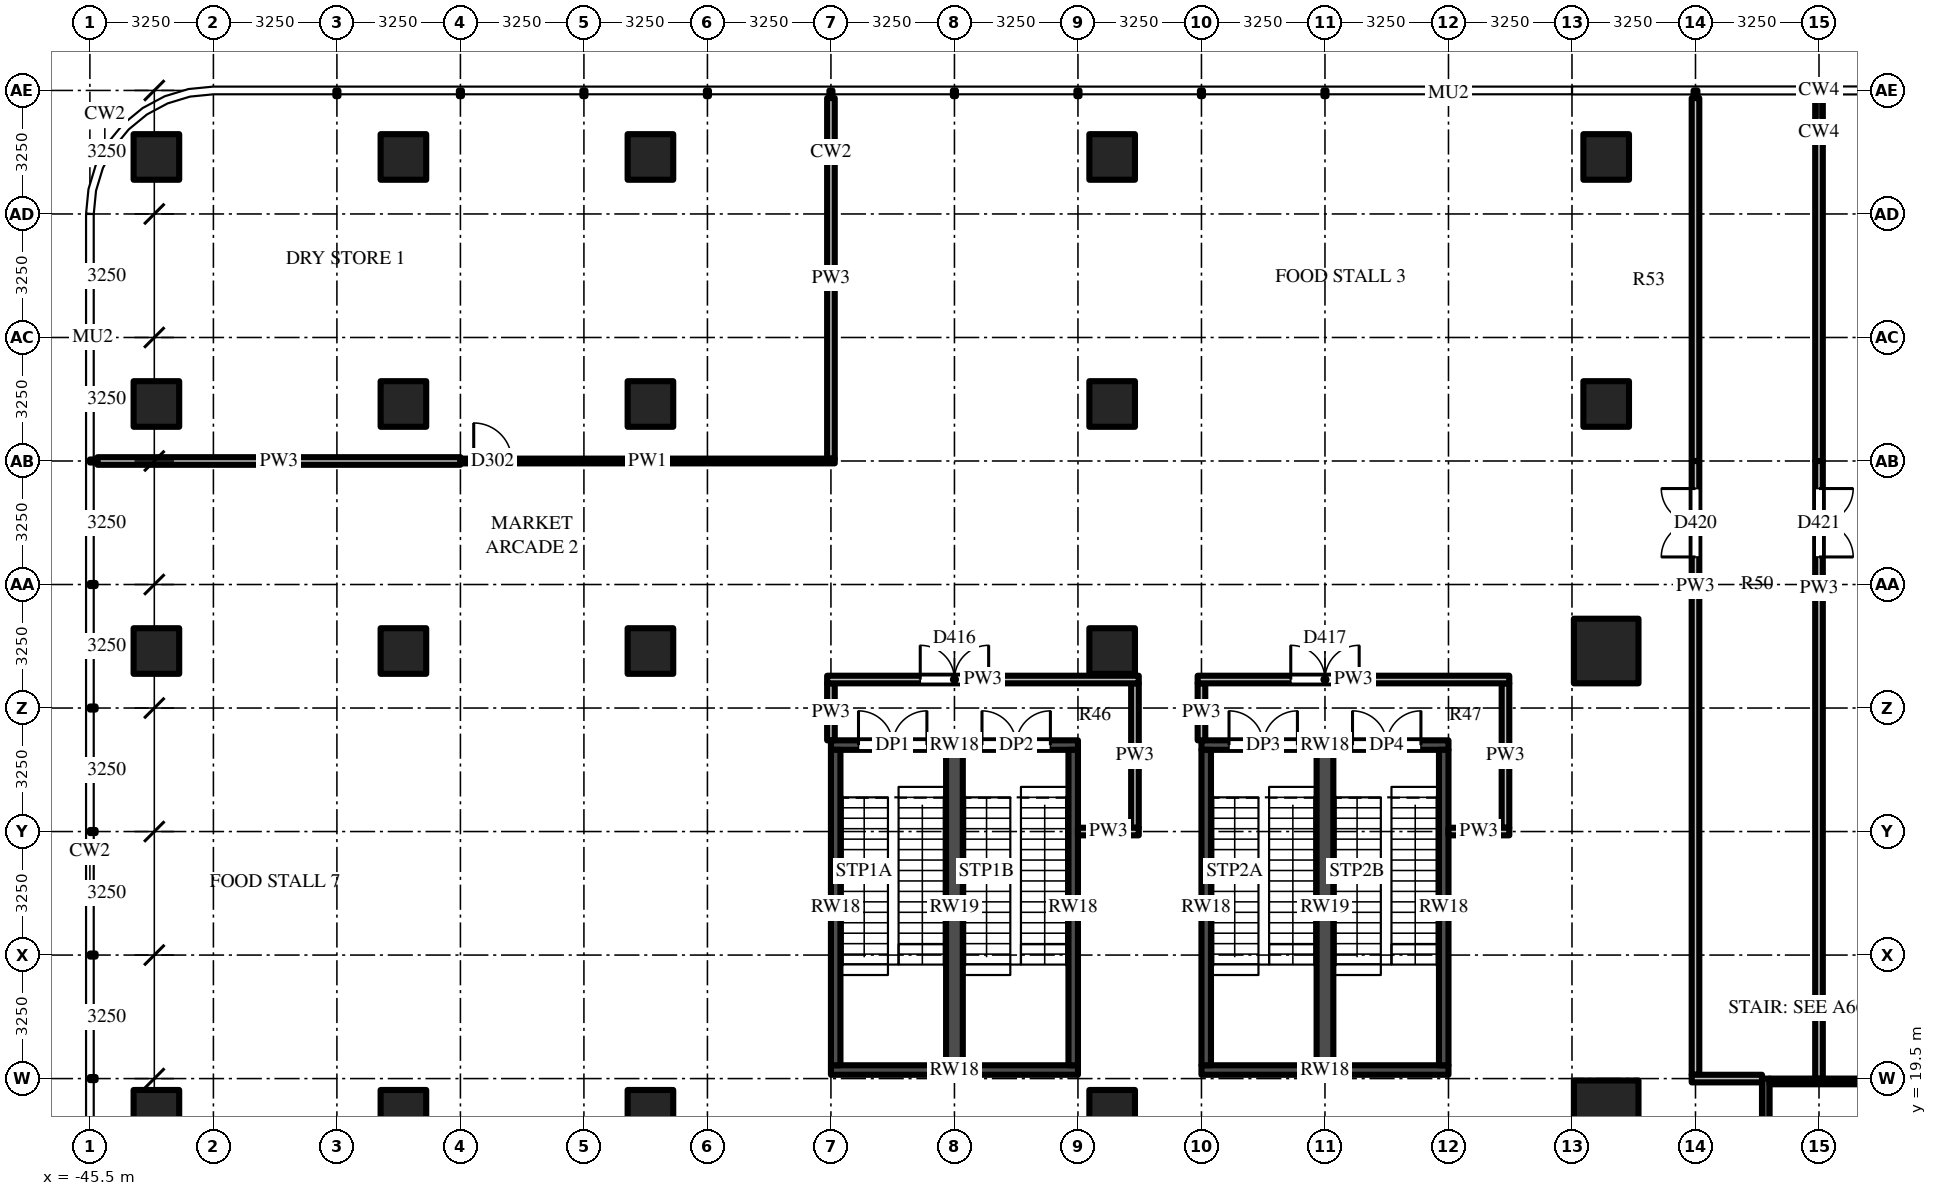
"""IFC4 building model, lengths in metres.
Left out: names, types, materials, properties, quantities, classifications, styles, units other than length and angle.
Written with IfcOpenShell. Run it as: python <this file> out.ifc"""

import sys

from ifc_helpers import new_model, si_unit, direction, frame, frame_2d, origin, origin_2d, place, context, subcontext, project, spatial, rectangle, extrude, source, transform, mapped, element, fill, save


model = new_model("IFC4")
c1 = context("Model", 3, precision=1e-05, world=origin(), true_north=direction((0.0, 1.0)))
c2 = subcontext(c1, "Body", "Model", "MODEL_VIEW")
j1 = project(units=[si_unit("LENGTHUNIT", "METRE"), si_unit("PLANEANGLEUNIT", "RADIAN")], contexts=[c1])
p1 = place(None, origin())
s1 = spatial("IfcSite", under=j1, at=p1, CompositionType="ELEMENT")
p2 = place(p1, origin())
s2 = spatial("IfcBuilding", under=s1, at=p2, CompositionType="ELEMENT")
p3 = place(p2, frame((0.0, 0.0, 8.0)))
s3 = spatial("IfcBuildingStorey", under=s2, at=p3, CompositionType="ELEMENT", Elevation=8.0)
m1 = source(origin(), c2, "Body", "SweptSolid", [
    extrude(rectangle(XDim=1.7, YDim=1.7, at=origin_2d()), origin(), (0.0, 0.0, 1.0), 6.0),
])
for number, where, z_axis, x_axis in (
    (1, (-5.6, 18.6, 0.0), (0.0, 0.0, 1.0), (1.0, 0.0, 0.0)),
    (2, (-5.6, 30.75, 0.0), (0.0, 0.0, 1.0), (1.0, 0.0, 0.0)),
):
    element("IfcColumn", number, at=place(p3, frame(where, z_axis=z_axis, x_axis=x_axis)), inside=s3, PredefinedType="COLUMN", context=c2, shape_type="MappedRepresentation", body=[
        mapped(m1, transform((0.0, 0.0, 0.0))),
    ])
m2 = source(origin(), c2, "Body", "SweptSolid", [
    extrude(rectangle(XDim=1.2, YDim=1.2, at=origin_2d()), origin(), (0.0, 0.0, 1.0), 6.0),
])
for number, where, z_axis, x_axis in (
    (3, (-5.6, 37.25, 0.0), (0.0, 0.0, 1.0), (1.0, 0.0, 0.0)),
    (4, (-5.6, 43.75, 0.0), (0.0, 0.0, 1.0), (1.0, 0.0, 0.0)),
    (5, (-18.6, 18.6, 0.0), (0.0, 0.0, 1.0), (1.0, 0.0, 0.0)),
    (6, (-18.6, 30.75, 0.0), (0.0, 0.0, 1.0), (1.0, 0.0, 0.0)),
    (7, (-18.6, 37.25, 0.0), (0.0, 0.0, 1.0), (1.0, 0.0, 0.0)),
    (8, (-18.6, 43.75, 0.0), (0.0, 0.0, 1.0), (1.0, 0.0, 0.0)),
    (9, (-30.75, 18.6, 0.0), (0.0, 0.0, 1.0), (1.0, 0.0, 0.0)),
    (10, (-30.75, 30.75, 0.0), (0.0, 0.0, 1.0), (1.0, 0.0, 0.0)),
    (11, (-30.75, 37.25, 0.0), (0.0, 0.0, 1.0), (1.0, 0.0, 0.0)),
    (12, (-30.75, 43.75, 0.0), (0.0, 0.0, 1.0), (1.0, 0.0, 0.0)),
    (13, (-37.25, 18.6, 0.0), (0.0, 0.0, 1.0), (1.0, 0.0, 0.0)),
    (14, (-37.25, 30.75, 0.0), (0.0, 0.0, 1.0), (1.0, 0.0, 0.0)),
    (15, (-37.25, 37.25, 0.0), (0.0, 0.0, 1.0), (1.0, 0.0, 0.0)),
    (16, (-37.25, 43.75, 0.0), (0.0, 0.0, 1.0), (1.0, 0.0, 0.0)),
    (17, (-43.75, 18.6, 0.0), (0.0, 0.0, 1.0), (1.0, 0.0, 0.0)),
    (18, (-43.75, 30.75, 0.0), (0.0, 0.0, 1.0), (1.0, 0.0, 0.0)),
    (19, (-43.75, 37.25, 0.0), (0.0, 0.0, 1.0), (1.0, 0.0, 0.0)),
    (20, (-43.75, 43.75, 0.0), (0.0, 0.0, 1.0), (1.0, 0.0, 0.0)),
):
    element("IfcColumn", number, at=place(p3, frame(where, z_axis=z_axis, x_axis=x_axis)), inside=s3, PredefinedType="COLUMN", context=c2, shape_type="MappedRepresentation", body=[
        mapped(m2, transform((0.0, 0.0, 0.0))),
    ])
m3 = source(origin(), c2, "Body", "SweptSolid", [
    extrude(rectangle(XDim=6.0, YDim=0.2, at=frame_2d((3.0, 0.0))), origin(), (0.0, 0.0, 1.0), 5.7),
])
p4 = place(p3, frame((-1.4, 13.5, 0.0), z_axis=(0.0, 0.0, 1.0), x_axis=(0.0, 1.0, 0.0)))
e21 = element("IfcWall", 21, at=p4, inside=s3, PredefinedType="SHEAR", context=c2, shape_type="MappedRepresentation", body=[
    mapped(m3, transform((0.0, 0.0, 0.0))),
])
m4 = source(origin(), c2, "Body", "SweptSolid", [
    extrude(rectangle(XDim=2.6, YDim=0.15, at=frame_2d((1.3, 0.0))), origin(), (0.0, 0.0, 1.0), 5.7),
])
p5 = place(p3, frame((-1.3, 19.425, 0.0), z_axis=(0.0, 0.0, 1.0), x_axis=(1.0, 0.0, 0.0)))
e22 = element("IfcWall", 22, at=p5, inside=s3, PredefinedType="SHEAR", context=c2, shape_type="MappedRepresentation", body=[
    mapped(m4, transform((0.0, 0.0, 0.0))),
])
m5 = source(origin(), c2, "Body", "SweptSolid", [
    extrude(rectangle(XDim=6.5, YDim=0.25, at=frame_2d((3.25, 0.0))), origin(), (0.0, 0.0, 1.0), 5.7),
])
p6 = place(p3, frame((-26.0, 28.275, 0.0), z_axis=(0.0, 0.0, 1.0), x_axis=(1.0, 0.0, 0.0)))
e23 = element("IfcWall", 23, at=p6, inside=s3, PredefinedType="SHEAR", context=c2, shape_type="MappedRepresentation", body=[
    mapped(m5, transform((0.0, 0.0, 0.0))),
])
m6 = source(origin(), c2, "Body", "SweptSolid", [
    extrude(rectangle(XDim=1.8, YDim=2.1, at=frame_2d((0.9, 1.05))), frame((0.0, 0.135, 0.0), z_axis=(0.0, -1.0, 0.0), x_axis=(1.0, 0.0, 0.0)), (0.0, 0.0, 1.0), 0.27),
])
p7 = place(p6, frame((0.725, 0.0, 0.0)))
e24 = element("IfcOpeningElement", 24, at=p7, cuts=e23, PredefinedType="OPENING", context=c2, shape_type="MappedRepresentation", body=[
    mapped(m6, transform((0.0, 0.0, 0.0))),
])
p8 = place(p6, frame((3.975, 0.0, 0.0)))
e25 = element("IfcOpeningElement", 25, at=p8, cuts=e23, PredefinedType="OPENING", context=c2, shape_type="MappedRepresentation", body=[
    mapped(m6, transform((0.0, 0.0, 0.0))),
])
p9 = place(p3, frame((-26.0, 19.725, 0.0), z_axis=(0.0, 0.0, 1.0), x_axis=(1.0, 0.0, 0.0)))
e26 = element("IfcWall", 26, at=p9, inside=s3, PredefinedType="SHEAR", context=c2, shape_type="MappedRepresentation", body=[
    mapped(m5, transform((0.0, 0.0, 0.0))),
])
m7 = source(origin(), c2, "Body", "SweptSolid", [
    extrude(rectangle(XDim=8.3, YDim=0.25, at=frame_2d((4.15, 0.0))), origin(), (0.0, 0.0, 1.0), 5.7),
])
for number, where, z_axis, x_axis in (
    (27, (-25.875, 19.85, 0.0), (0.0, 0.0, 1.0), (0.0, 1.0, 0.0)),
    (28, (-19.625, 19.85, 0.0), (0.0, 0.0, 1.0), (0.0, 1.0, 0.0)),
):
    element("IfcWall", number, at=place(p3, frame(where, z_axis=z_axis, x_axis=x_axis)), inside=s3, PredefinedType="SHEAR", context=c2, shape_type="MappedRepresentation", body=[
        mapped(m7, transform((0.0, 0.0, 0.0))),
    ])
m8 = source(origin(), c2, "Body", "SweptSolid", [
    extrude(rectangle(XDim=8.3, YDim=0.44, at=frame_2d((4.15, 0.0))), origin(), (0.0, 0.0, 1.0), 5.7),
])
p10 = place(p3, frame((-22.75, 19.85, 0.0), z_axis=(0.0, 0.0, 1.0), x_axis=(0.0, 1.0, 0.0)))
e29 = element("IfcWall", 29, at=p10, inside=s3, PredefinedType="SHEAR", context=c2, shape_type="MappedRepresentation", body=[
    mapped(m8, transform((0.0, 0.0, 0.0))),
])
p11 = place(p3, frame((-16.25, 28.275, 0.0), z_axis=(0.0, 0.0, 1.0), x_axis=(1.0, 0.0, 0.0)))
e30 = element("IfcWall", 30, at=p11, inside=s3, PredefinedType="SHEAR", context=c2, shape_type="MappedRepresentation", body=[
    mapped(m5, transform((0.0, 0.0, 0.0))),
])
p12 = place(p11, frame((0.725, 0.0, 0.0)))
e31 = element("IfcOpeningElement", 31, at=p12, cuts=e30, PredefinedType="OPENING", context=c2, shape_type="MappedRepresentation", body=[
    mapped(m6, transform((0.0, 0.0, 0.0))),
])
p13 = place(p11, frame((3.975, 0.0, 0.0)))
e32 = element("IfcOpeningElement", 32, at=p13, cuts=e30, PredefinedType="OPENING", context=c2, shape_type="MappedRepresentation", body=[
    mapped(m6, transform((0.0, 0.0, 0.0))),
])
p14 = place(p3, frame((-16.25, 19.725, 0.0), z_axis=(0.0, 0.0, 1.0), x_axis=(1.0, 0.0, 0.0)))
e33 = element("IfcWall", 33, at=p14, inside=s3, PredefinedType="SHEAR", context=c2, shape_type="MappedRepresentation", body=[
    mapped(m5, transform((0.0, 0.0, 0.0))),
])
for number, where, z_axis, x_axis in (
    (34, (-16.125, 19.85, 0.0), (0.0, 0.0, 1.0), (0.0, 1.0, 0.0)),
    (35, (-9.875, 19.85, 0.0), (0.0, 0.0, 1.0), (0.0, 1.0, 0.0)),
):
    element("IfcWall", number, at=place(p3, frame(where, z_axis=z_axis, x_axis=x_axis)), inside=s3, PredefinedType="SHEAR", context=c2, shape_type="MappedRepresentation", body=[
        mapped(m7, transform((0.0, 0.0, 0.0))),
    ])
p15 = place(p3, frame((-13.0, 19.85, 0.0), z_axis=(0.0, 0.0, 1.0), x_axis=(0.0, 1.0, 0.0)))
e36 = element("IfcWall", 36, at=p15, inside=s3, PredefinedType="SHEAR", context=c2, shape_type="MappedRepresentation", body=[
    mapped(m8, transform((0.0, 0.0, 0.0))),
])
m9 = source(origin(), c2, "Body", "SweptSolid", [
    extrude(rectangle(XDim=9.488, YDim=0.2, at=frame_2d((4.744, 0.0))), origin(), (0.0, 0.0, 1.0), 4.839),
])
p16 = place(p3, frame((-26.0, 35.812, 0.0), z_axis=(0.0, 0.0, 1.0), x_axis=(0.0, 1.0, 0.0)))
e37 = element("IfcWall", 37, at=p16, inside=s3, PredefinedType="PARTITIONING", context=c2, shape_type="MappedRepresentation", body=[
    mapped(m9, transform((0.0, 0.0, 0.0))),
])
m10 = source(origin(), c2, "Body", "SweptSolid", [
    extrude(rectangle(XDim=1.5, YDim=0.2, at=frame_2d((0.75, 0.0))), origin(), (0.0, 0.0, 1.0), 5.7),
])
p17 = place(p3, frame((-26.0, 29.9, 0.0), z_axis=(0.0, 0.0, 1.0), x_axis=(0.0, -1.0, 0.0)))
e38 = element("IfcWall", 38, at=p17, inside=s3, PredefinedType="PARTITIONING", context=c2, shape_type="MappedRepresentation", body=[
    mapped(m10, transform((0.0, 0.0, 0.0))),
])
m11 = source(origin(), c2, "Body", "SweptSolid", [
    extrude(rectangle(XDim=3.8, YDim=0.2, at=frame_2d((1.9, 0.0))), origin(), (0.0, 0.0, 1.0), 5.223),
])
p18 = place(p3, frame((-18.0, 29.9, 0.0), z_axis=(0.0, 0.0, 1.0), x_axis=(0.0, -1.0, 0.0)))
e39 = element("IfcWall", 39, at=p18, inside=s3, PredefinedType="PARTITIONING", context=c2, shape_type="MappedRepresentation", body=[
    mapped(m11, transform((0.0, 0.0, 0.0))),
])
p19 = place(p3, frame((-16.25, 28.4, 0.0), z_axis=(0.0, 0.0, 1.0), x_axis=(0.0, 1.0, 0.0)))
e40 = element("IfcWall", 40, at=p19, inside=s3, PredefinedType="PARTITIONING", context=c2, shape_type="MappedRepresentation", body=[
    mapped(m10, transform((0.0, 0.0, 0.0))),
])
p20 = place(p3, frame((-8.25, 26.1, 0.0), z_axis=(0.0, 0.0, 1.0), x_axis=(0.0, 1.0, 0.0)))
e41 = element("IfcWall", 41, at=p20, inside=s3, PredefinedType="PARTITIONING", context=c2, shape_type="MappedRepresentation", body=[
    mapped(m11, transform((0.0, 0.0, 0.0))),
])
m12 = source(origin(), c2, "Body", "SweptSolid", [
    extrude(rectangle(XDim=3.25, YDim=0.2, at=frame_2d((1.625, 0.0))), origin(), (0.0, 0.0, 1.0), 4.997),
])
p21 = place(p3, frame((-3.25, 32.5, 0.0), z_axis=(0.0, 0.0, 1.0), x_axis=(0.0, 1.0, 0.0)))
e42 = element("IfcWall", 42, at=p21, inside=s3, PredefinedType="PARTITIONING", context=c2, shape_type="MappedRepresentation", body=[
    mapped(m12, transform((0.0, 0.0, 0.0))),
])
m13 = source(origin(), c2, "Body", "SweptSolid", [
    extrude(rectangle(XDim=1.8, YDim=2.1, at=frame_2d((0.9, 1.05))), frame((0.0, 0.11, 0.0), z_axis=(0.0, -1.0, 0.0), x_axis=(1.0, 0.0, 0.0)), (0.0, 0.0, 1.0), 0.22),
])
p22 = place(p21, frame((0.725, 0.0, 0.0)))
e43 = element("IfcOpeningElement", 43, at=p22, cuts=e42, PredefinedType="OPENING", context=c2, shape_type="MappedRepresentation", body=[
    mapped(m13, transform((0.0, 0.0, 0.0))),
])
m14 = source(origin(), c2, "Body", "SweptSolid", [
    extrude(rectangle(XDim=12.9, YDim=0.2, at=frame_2d((6.45, 0.0))), origin(), (0.0, 0.0, 1.0), 4.918),
])
p23 = place(p3, frame((-3.25, 19.6, 0.0), z_axis=(0.0, 0.0, 1.0), x_axis=(0.0, 1.0, 0.0)))
e44 = element("IfcWall", 44, at=p23, inside=s3, PredefinedType="PARTITIONING", context=c2, shape_type="MappedRepresentation", body=[
    mapped(m14, transform((0.0, 0.0, 0.0))),
])
m15 = source(origin(), c2, "Body", "SweptSolid", [
    extrude(rectangle(XDim=9.55, YDim=0.2, at=frame_2d((4.775, 0.0))), origin(), (0.0, 0.0, 1.0), 4.918),
])
p24 = place(p3, frame((-3.25, 35.75, 0.0), z_axis=(0.0, 0.0, 1.0), x_axis=(0.0, 1.0, 0.0)))
e45 = element("IfcWall", 45, at=p24, inside=s3, PredefinedType="PARTITIONING", context=c2, shape_type="MappedRepresentation", body=[
    mapped(m15, transform((0.0, 0.0, 0.0))),
])
p25 = place(p3, frame((0.0, 35.75, 0.0), z_axis=(0.0, 0.0, 1.0), x_axis=(0.0, -1.0, 0.0)))
e46 = element("IfcWall", 46, at=p25, inside=s3, PredefinedType="PARTITIONING", context=c2, shape_type="MappedRepresentation", body=[
    mapped(m12, transform((0.0, 0.0, 0.0))),
])
p26 = place(p25, frame((0.725, 0.0, 0.0)))
e47 = element("IfcOpeningElement", 47, at=p26, cuts=e46, PredefinedType="OPENING", context=c2, shape_type="MappedRepresentation", body=[
    mapped(m13, transform((0.0, 0.0, 0.0))),
])
p27 = place(p3, frame((0.0, 45.3, 0.0), z_axis=(0.0, 0.0, 1.0), x_axis=(0.0, -1.0, 0.0)))
e48 = element("IfcWall", 48, at=p27, inside=s3, PredefinedType="PARTITIONING", context=c2, shape_type="MappedRepresentation", body=[
    mapped(m15, transform((0.0, 0.0, 0.0))),
])
m16 = source(origin(), c2, "Body", "SweptSolid", [
    extrude(rectangle(XDim=13.0, YDim=0.2, at=frame_2d((6.5, 0.0))), origin(), (0.0, 0.0, 1.0), 4.918),
])
p28 = place(p3, frame((0.0, 19.5, 0.0), z_axis=(0.0, 0.0, 1.0), x_axis=(0.0, 1.0, 0.0)))
e49 = element("IfcWall", 49, at=p28, inside=s3, PredefinedType="PARTITIONING", context=c2, shape_type="MappedRepresentation", body=[
    mapped(m16, transform((0.0, 0.0, 0.0))),
])
m17 = source(origin(), c2, "Body", "SweptSolid", [
    extrude(rectangle(XDim=1.85, YDim=0.2, at=frame_2d((0.925, 0.0))), origin(), (0.0, 0.0, 1.0), 4.997),
])
p29 = place(p3, frame((-1.5, 19.5, 0.0), z_axis=(0.0, 0.0, 1.0), x_axis=(-1.0, 0.0, 0.0)))
e50 = element("IfcWall", 50, at=p29, inside=s3, PredefinedType="PARTITIONING", context=c2, shape_type="MappedRepresentation", body=[
    mapped(m17, transform((0.0, 0.0, 0.0))),
])
m18 = source(origin(), c2, "Body", "SweptSolid", [
    extrude(rectangle(XDim=1.6, YDim=0.2, at=frame_2d((0.8, 0.0))), origin(), (0.0, 0.0, 1.0), 4.839),
])
p30 = place(p3, frame((-17.9, 26.0, 0.0), z_axis=(0.0, 0.0, 1.0), x_axis=(-1.0, 0.0, 0.0)))
e51 = element("IfcWall", 51, at=p30, inside=s3, PredefinedType="PARTITIONING", context=c2, shape_type="MappedRepresentation", body=[
    mapped(m18, transform((0.0, 0.0, 0.0))),
])
m19 = source(origin(), c2, "Body", "SweptSolid", [
    extrude(rectangle(XDim=1.6, YDim=0.2, at=frame_2d((0.8, 0.0))), origin(), (0.0, 0.0, 1.0), 5.7),
])
p31 = place(p3, frame((-8.15, 26.0, 0.0), z_axis=(0.0, 0.0, 1.0), x_axis=(-1.0, 0.0, 0.0)))
e52 = element("IfcWall", 52, at=p31, inside=s3, PredefinedType="PARTITIONING", context=c2, shape_type="MappedRepresentation", body=[
    mapped(m19, transform((0.0, 0.0, 0.0))),
])
m20 = source(origin(), c2, "Body", "SweptSolid", [
    extrude(rectangle(XDim=8.2, YDim=0.2, at=frame_2d((4.1, 0.0))), origin(), (0.0, 0.0, 1.0), 4.839),
])
p32 = place(p3, frame((-26.1, 30.0, 0.0), z_axis=(0.0, 0.0, 1.0), x_axis=(1.0, 0.0, 0.0)))
e53 = element("IfcWall", 53, at=p32, inside=s3, PredefinedType="PARTITIONING", context=c2, shape_type="MappedRepresentation", body=[
    mapped(m20, transform((0.0, 0.0, 0.0))),
])
p33 = place(p32, frame((2.45, 0.0, 0.0)))
e54 = element("IfcOpeningElement", 54, at=p33, cuts=e53, PredefinedType="OPENING", context=c2, shape_type="MappedRepresentation", body=[
    mapped(m13, transform((0.0, 0.0, 0.0))),
])
m21 = source(origin(), c2, "Body", "SweptSolid", [
    extrude(rectangle(XDim=8.2, YDim=0.2, at=frame_2d((4.1, 0.0))), origin(), (0.0, 0.0, 1.0), 5.7),
])
p34 = place(p3, frame((-16.35, 30.0, 0.0), z_axis=(0.0, 0.0, 1.0), x_axis=(1.0, 0.0, 0.0)))
e55 = element("IfcWall", 55, at=p34, inside=s3, PredefinedType="PARTITIONING", context=c2, shape_type="MappedRepresentation", body=[
    mapped(m21, transform((0.0, 0.0, 0.0))),
])
p35 = place(p34, frame((2.45, 0.0, 0.0)))
e56 = element("IfcOpeningElement", 56, at=p35, cuts=e55, PredefinedType="OPENING", context=c2, shape_type="MappedRepresentation", body=[
    mapped(m13, transform((0.0, 0.0, 0.0))),
])
m22 = source(origin(), c2, "Body", "SweptSolid", [
    extrude(rectangle(XDim=9.55, YDim=0.2, at=frame_2d((4.775, 0.0))), origin(), (0.0, 0.0, 1.0), 4.997),
])
p36 = place(p3, frame((-45.3, 35.75, 0.0), z_axis=(0.0, 0.0, 1.0), x_axis=(1.0, 0.0, 0.0)))
e57 = element("IfcWall", 57, at=p36, inside=s3, PredefinedType="PARTITIONING", context=c2, shape_type="MappedRepresentation", body=[
    mapped(m22, transform((0.0, 0.0, 0.0))),
])
m23 = source(origin(), c2, "Body", "SweptSolid", [
    extrude(rectangle(XDim=9.85, YDim=0.125, at=frame_2d((4.925, 0.0))), origin(), (0.0, 0.0, 1.0), 4.997),
])
p37 = place(p3, frame((-35.75, 35.75, 0.0), z_axis=(0.0, 0.0, 1.0), x_axis=(1.0, 0.0, 0.0)))
e58 = element("IfcWall", 58, at=p37, inside=s3, PredefinedType="PARTITIONING", context=c2, shape_type="MappedRepresentation", body=[
    mapped(m23, transform((0.0, 0.0, 0.0))),
])
m24 = source(origin(), c2, "Body", "SweptSolid", [
    extrude(rectangle(XDim=1.0, YDim=2.1, at=frame_2d((0.5, 1.05))), frame((0.0, 0.073, 0.0), z_axis=(0.0, -1.0, 0.0), x_axis=(1.0, 0.0, 0.0)), (0.0, 0.0, 1.0), 0.145),
])
p38 = place(p37, frame((0.35, 0.0, 0.0)))
e59 = element("IfcOpeningElement", 59, at=p38, cuts=e58, PredefinedType="OPENING", context=c2, shape_type="MappedRepresentation", body=[
    mapped(m24, transform((0.0, 0.0, 0.0))),
])
m25 = source(origin(), c2, "Body", "SweptSolid", [
    extrude(rectangle(XDim=1.8, YDim=2.1, at=frame_2d((0.9, 1.05))), frame((0.0, 0.025, 0.0), z_axis=(0.0, -1.0, 0.0), x_axis=(1.0, 0.0, 0.0)), (0.0, 0.0, 1.0), 0.05),
])
p39 = place(p7, origin())
e60 = element("IfcDoor", 60, at=p39, inside=s3, OperationType="DOUBLE_DOOR_SINGLE_SWING", PredefinedType="DOOR", context=c2, shape_type="MappedRepresentation", body=[
    mapped(m25, transform((0.0, 0.0, 0.0))),
])
fill(e24, e60)
p40 = place(p8, origin())
e61 = element("IfcDoor", 61, at=p40, inside=s3, OperationType="DOUBLE_DOOR_SINGLE_SWING", PredefinedType="DOOR", context=c2, shape_type="MappedRepresentation", body=[
    mapped(m25, transform((0.0, 0.0, 0.0))),
])
fill(e25, e61)
p41 = place(p12, origin())
e62 = element("IfcDoor", 62, at=p41, inside=s3, OperationType="DOUBLE_DOOR_SINGLE_SWING", PredefinedType="DOOR", context=c2, shape_type="MappedRepresentation", body=[
    mapped(m25, transform((0.0, 0.0, 0.0))),
])
fill(e31, e62)
p42 = place(p13, origin())
e63 = element("IfcDoor", 63, at=p42, inside=s3, OperationType="DOUBLE_DOOR_SINGLE_SWING", PredefinedType="DOOR", context=c2, shape_type="MappedRepresentation", body=[
    mapped(m25, transform((0.0, 0.0, 0.0))),
])
fill(e32, e63)
p43 = place(p33, origin())
e64 = element("IfcDoor", 64, at=p43, inside=s3, OperationType="DOUBLE_DOOR_SINGLE_SWING", PredefinedType="DOOR", context=c2, shape_type="MappedRepresentation", body=[
    mapped(m25, transform((0.0, 0.0, 0.0))),
])
fill(e54, e64)
p44 = place(p35, origin())
e65 = element("IfcDoor", 65, at=p44, inside=s3, OperationType="DOUBLE_DOOR_SINGLE_SWING", PredefinedType="DOOR", context=c2, shape_type="MappedRepresentation", body=[
    mapped(m25, transform((0.0, 0.0, 0.0))),
])
fill(e56, e65)
p45 = place(p22, origin())
e66 = element("IfcDoor", 66, at=p45, inside=s3, OperationType="DOUBLE_DOOR_SINGLE_SWING", PredefinedType="DOOR", context=c2, shape_type="MappedRepresentation", body=[
    mapped(m25, transform((0.0, 0.0, 0.0))),
])
fill(e43, e66)
p46 = place(p26, origin())
e67 = element("IfcDoor", 67, at=p46, inside=s3, OperationType="DOUBLE_DOOR_SINGLE_SWING", PredefinedType="DOOR", context=c2, shape_type="MappedRepresentation", body=[
    mapped(m25, transform((0.0, 0.0, 0.0))),
])
fill(e47, e67)
m26 = source(origin(), c2, "Body", "SweptSolid", [
    extrude(rectangle(XDim=1.0, YDim=2.1, at=frame_2d((0.5, 1.05))), frame((0.0, 0.025, 0.0), z_axis=(0.0, -1.0, 0.0), x_axis=(1.0, 0.0, 0.0)), (0.0, 0.0, 1.0), 0.05),
])
p47 = place(p38, origin())
e68 = element("IfcDoor", 68, at=p47, inside=s3, OperationType="SINGLE_SWING_LEFT", PredefinedType="DOOR", context=c2, shape_type="MappedRepresentation", body=[
    mapped(m26, transform((0.0, 0.0, 0.0))),
])
fill(e59, e68)
save(model, sys.argv[1])
